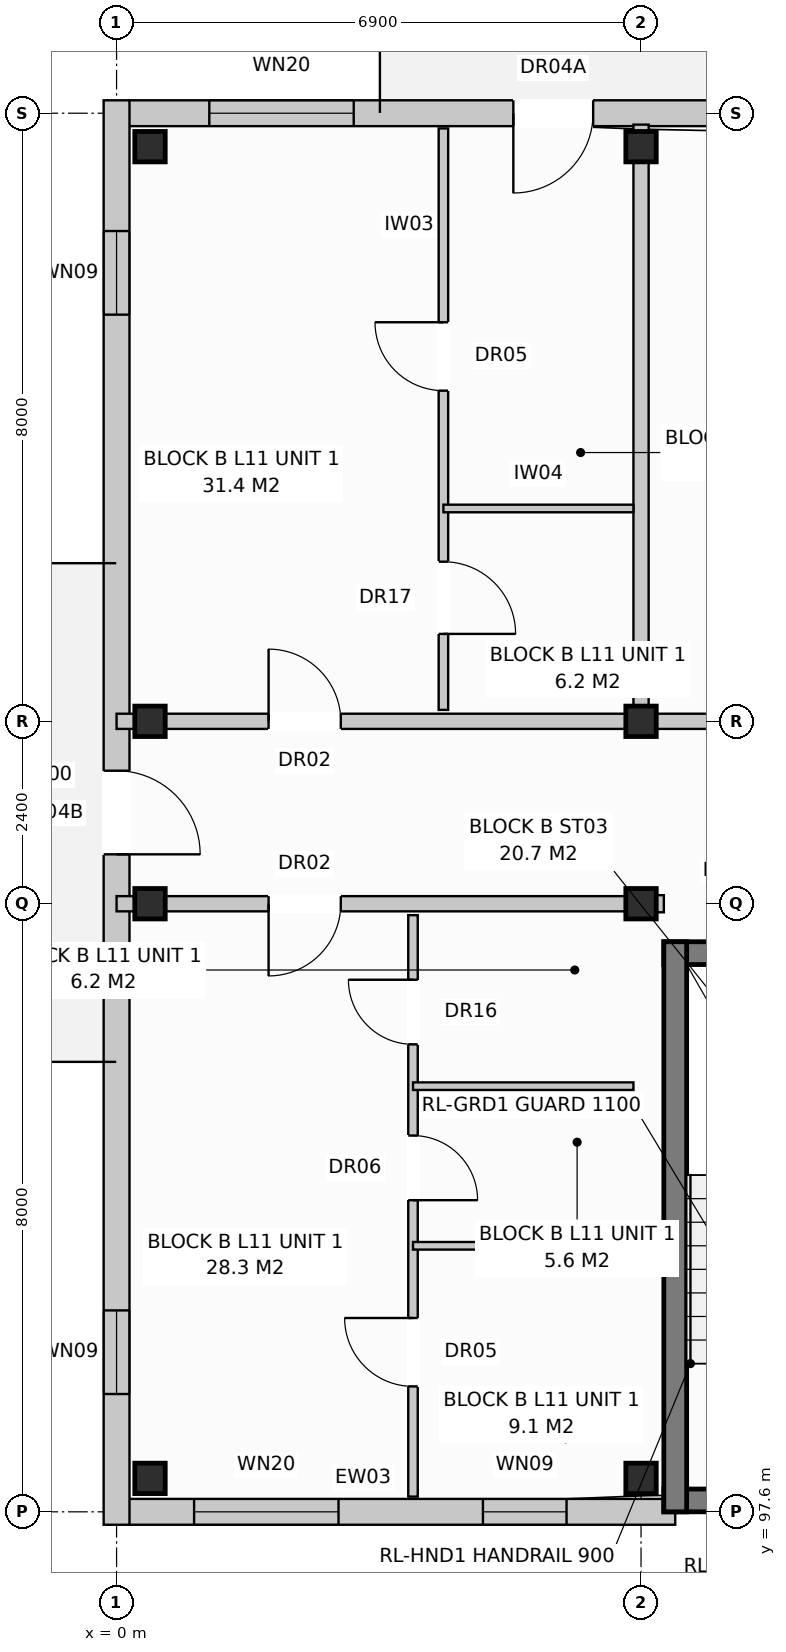
"""IFC4 building model, lengths in metres.
Left out: names, types, materials, properties, quantities, classifications, styles, units other than length and angle.
Written with IfcOpenShell. Run it as: python <this file> out.ifc"""

import sys

from ifc_helpers import new_model, si_unit, direction, frame, frame_2d, origin, origin_with_axes, origin_2d, place, context, subcontext, project, spatial, rectangle, extrude, element, fill, save


model = new_model("IFC4")
c1 = context("Model", 3, precision=1e-05, world=origin(), true_north=direction((0.0, 1.0)))
c2 = subcontext(c1, "Body", "Model", "MODEL_VIEW")
j1 = project(units=[si_unit("LENGTHUNIT", "METRE"), si_unit("PLANEANGLEUNIT", "RADIAN")], contexts=[c1])
p1 = place(None, origin())
s1 = spatial("IfcSite", under=j1, at=p1, CompositionType="ELEMENT")
p2 = place(p1, origin())
s2 = spatial("IfcBuilding", under=s1, at=p2, CompositionType="ELEMENT")
p3 = place(p2, frame((0.0, 0.0, 36.8)))
s3 = spatial("IfcBuildingStorey", under=s2, at=p3, CompositionType="ELEMENT", Elevation=36.8)
for number, where, z_axis, x_axis in (
    (1, (0.44, 98.04, 0.0), (0.0, 0.0, 1.0), (1.0, 0.0, 0.0)),
    (2, (0.44, 105.6, 0.0), (0.0, 0.0, 1.0), (1.0, 0.0, 0.0)),
    (3, (0.44, 108.0, 0.0), (0.0, 0.0, 1.0), (1.0, 0.0, 0.0)),
    (4, (0.44, 115.56, 0.0), (0.0, 0.0, 1.0), (1.0, 0.0, 0.0)),
    (5, (6.9, 98.04, 0.0), (0.0, 0.0, 1.0), (1.0, 0.0, 0.0)),
    (6, (6.9, 105.6, 0.0), (0.0, 0.0, 1.0), (1.0, 0.0, 0.0)),
    (7, (6.9, 108.0, 0.0), (0.0, 0.0, 1.0), (1.0, 0.0, 0.0)),
    (8, (6.9, 115.56, 0.0), (0.0, 0.0, 1.0), (1.0, 0.0, 0.0)),
):
    element("IfcColumn", number, at=place(p3, frame(where, z_axis=z_axis, x_axis=x_axis)), inside=s3, PredefinedType="COLUMN", context=c2, shape_type="SweptSolid", body=[
        extrude(rectangle(XDim=0.4, YDim=0.4, at=origin_2d()), origin(), (0.0, 0.0, 1.0), 3.2),
    ])
p4 = place(p3, frame((0.16, 97.6, 0.0), z_axis=(0.0, 0.0, 1.0), x_axis=(1.0, 0.0, 0.0)))
e9 = element("IfcWall", 9, at=p4, inside=s3, PredefinedType="STANDARD", context=c2, shape_type="SweptSolid", body=[
    extrude(rectangle(XDim=7.19, YDim=0.34, at=frame_2d((3.595, 0.0))), origin(), (0.0, 0.0, 1.0), 2.97),
])
p5 = place(p4, frame((0.86, 0.0, 0.8)))
e10 = element("IfcOpeningElement", 10, at=p5, cuts=e9, PredefinedType="OPENING", context=c2, shape_type="SweptSolid", body=[
    extrude(rectangle(XDim=1.9, YDim=1.85, at=frame_2d((0.95, 0.925))), frame((0.0, 0.182, 0.0), z_axis=(0.0, -1.0, 0.0), x_axis=(1.0, 0.0, 0.0)), (0.0, 0.0, 1.0), 0.364),
])
p6 = place(p4, frame((4.66, 0.0, 0.72)))
e11 = element("IfcOpeningElement", 11, at=p6, cuts=e9, PredefinedType="OPENING", context=c2, shape_type="SweptSolid", body=[
    extrude(rectangle(XDim=1.1, YDim=1.5, at=frame_2d((0.55, 0.75))), frame((0.0, 0.182, 0.0), z_axis=(0.0, -1.0, 0.0), x_axis=(1.0, 0.0, 0.0)), (0.0, 0.0, 1.0), 0.364),
])
p7 = place(p3, frame((0.16, 116.0, 0.0), z_axis=(0.0, 0.0, 1.0), x_axis=(1.0, 0.0, 0.0)))
e12 = element("IfcWall", 12, at=p7, inside=s3, PredefinedType="STANDARD", context=c2, shape_type="SweptSolid", body=[
    extrude(rectangle(XDim=41.08, YDim=0.34, at=frame_2d((20.54, 0.0))), origin(), (0.0, 0.0, 1.0), 2.97),
])
p8 = place(p7, frame((5.06, 0.0, 0.0)))
e13 = element("IfcOpeningElement", 13, at=p8, cuts=e12, PredefinedType="OPENING", context=c2, shape_type="SweptSolid", body=[
    extrude(rectangle(XDim=1.05, YDim=2.12, at=frame_2d((0.525, 1.06))), frame((0.0, 0.182, 0.0), z_axis=(0.0, -1.0, 0.0), x_axis=(1.0, 0.0, 0.0)), (0.0, 0.0, 1.0), 0.364),
])
p9 = place(p7, frame((18.86, 0.0, 0.0)))
e14 = element("IfcOpeningElement", 14, at=p9, cuts=e12, PredefinedType="OPENING", context=c2, shape_type="SweptSolid", body=[
    extrude(rectangle(XDim=1.05, YDim=2.12, at=frame_2d((0.525, 1.06))), frame((0.0, 0.182, 0.0), z_axis=(0.0, -1.0, 0.0), x_axis=(1.0, 0.0, 0.0)), (0.0, 0.0, 1.0), 0.364),
])
p10 = place(p7, frame((31.375, 0.0, 0.0)))
e15 = element("IfcOpeningElement", 15, at=p10, cuts=e12, PredefinedType="OPENING", context=c2, shape_type="SweptSolid", body=[
    extrude(rectangle(XDim=1.05, YDim=2.12, at=frame_2d((0.525, 1.06))), frame((0.0, 0.182, 0.0), z_axis=(0.0, -1.0, 0.0), x_axis=(1.0, 0.0, 0.0)), (0.0, 0.0, 1.0), 0.364),
])
p11 = place(p7, frame((1.06, 0.0, 0.8)))
e16 = element("IfcOpeningElement", 16, at=p11, cuts=e12, PredefinedType="OPENING", context=c2, shape_type="SweptSolid", body=[
    extrude(rectangle(XDim=1.9, YDim=1.85, at=frame_2d((0.95, 0.925))), frame((0.0, 0.182, 0.0), z_axis=(0.0, -1.0, 0.0), x_axis=(1.0, 0.0, 0.0)), (0.0, 0.0, 1.0), 0.364),
])
p12 = place(p7, frame((9.36, 0.0, 0.72)))
e17 = element("IfcOpeningElement", 17, at=p12, cuts=e12, PredefinedType="OPENING", context=c2, shape_type="SweptSolid", body=[
    extrude(rectangle(XDim=1.1, YDim=1.5, at=frame_2d((0.55, 0.75))), frame((0.0, 0.182, 0.0), z_axis=(0.0, -1.0, 0.0), x_axis=(1.0, 0.0, 0.0)), (0.0, 0.0, 1.0), 0.364),
])
p13 = place(p7, frame((14.71, 0.0, 0.8)))
e18 = element("IfcOpeningElement", 18, at=p13, cuts=e12, PredefinedType="OPENING", context=c2, shape_type="SweptSolid", body=[
    extrude(rectangle(XDim=1.8, YDim=1.7, at=frame_2d((0.9, 0.85))), frame((0.0, 0.182, 0.0), z_axis=(0.0, -1.0, 0.0), x_axis=(1.0, 0.0, 0.0)), (0.0, 0.0, 1.0), 0.364),
])
p14 = place(p7, frame((21.46, 0.0, 0.72)))
e19 = element("IfcOpeningElement", 19, at=p14, cuts=e12, PredefinedType="OPENING", context=c2, shape_type="SweptSolid", body=[
    extrude(rectangle(XDim=1.1, YDim=1.5, at=frame_2d((0.55, 0.75))), frame((0.0, 0.182, 0.0), z_axis=(0.0, -1.0, 0.0), x_axis=(1.0, 0.0, 0.0)), (0.0, 0.0, 1.0), 0.364),
])
p15 = place(p7, frame((24.435, 0.0, 0.8)))
e20 = element("IfcOpeningElement", 20, at=p15, cuts=e12, PredefinedType="OPENING", context=c2, shape_type="SweptSolid", body=[
    extrude(rectangle(XDim=1.95, YDim=1.65, at=frame_2d((0.975, 0.825))), frame((0.0, 0.182, 0.0), z_axis=(0.0, -1.0, 0.0), x_axis=(1.0, 0.0, 0.0)), (0.0, 0.0, 1.0), 0.364),
])
p16 = place(p7, frame((29.21, 0.0, 0.8)))
e21 = element("IfcOpeningElement", 21, at=p16, cuts=e12, PredefinedType="OPENING", context=c2, shape_type="SweptSolid", body=[
    extrude(rectangle(XDim=1.8, YDim=1.7, at=frame_2d((0.9, 0.85))), frame((0.0, 0.182, 0.0), z_axis=(0.0, -1.0, 0.0), x_axis=(1.0, 0.0, 0.0)), (0.0, 0.0, 1.0), 0.364),
])
p17 = place(p7, frame((35.26, 0.0, 0.72)))
e22 = element("IfcOpeningElement", 22, at=p17, cuts=e12, PredefinedType="OPENING", context=c2, shape_type="SweptSolid", body=[
    extrude(rectangle(XDim=1.1, YDim=1.5, at=frame_2d((0.55, 0.75))), frame((0.0, 0.182, 0.0), z_axis=(0.0, -1.0, 0.0), x_axis=(1.0, 0.0, 0.0)), (0.0, 0.0, 1.0), 0.364),
])
p18 = place(p7, frame((38.035, 0.0, 0.8)))
e23 = element("IfcOpeningElement", 23, at=p18, cuts=e12, PredefinedType="OPENING", context=c2, shape_type="SweptSolid", body=[
    extrude(rectangle(XDim=1.95, YDim=1.65, at=frame_2d((0.975, 0.825))), frame((0.0, 0.182, 0.0), z_axis=(0.0, -1.0, 0.0), x_axis=(1.0, 0.0, 0.0)), (0.0, 0.0, 1.0), 0.364),
])
p19 = place(p3, frame((0.0, 97.43, 0.0), z_axis=(0.0, 0.0, 1.0), x_axis=(0.0, 1.0, 0.0)))
e24 = element("IfcWall", 24, at=p19, inside=s3, PredefinedType="STANDARD", context=c2, shape_type="SweptSolid", body=[
    extrude(rectangle(XDim=18.74, YDim=0.34, at=frame_2d((9.37, 0.0))), origin(), (0.0, 0.0, 1.0), 2.97),
])
p20 = place(p19, frame((8.82, 0.0, 0.0)))
e25 = element("IfcOpeningElement", 25, at=p20, cuts=e24, PredefinedType="OPENING", context=c2, shape_type="SweptSolid", body=[
    extrude(rectangle(XDim=1.1, YDim=2.1, at=frame_2d((0.55, 1.05))), frame((0.0, 0.182, 0.0), z_axis=(0.0, -1.0, 0.0), x_axis=(1.0, 0.0, 0.0)), (0.0, 0.0, 1.0), 0.364),
])
p21 = place(p19, frame((1.72, 0.0, 0.72)))
e26 = element("IfcOpeningElement", 26, at=p21, cuts=e24, PredefinedType="OPENING", context=c2, shape_type="SweptSolid", body=[
    extrude(rectangle(XDim=1.1, YDim=1.5, at=frame_2d((0.55, 0.75))), frame((0.0, 0.182, 0.0), z_axis=(0.0, -1.0, 0.0), x_axis=(1.0, 0.0, 0.0)), (0.0, 0.0, 1.0), 0.364),
])
p22 = place(p19, frame((15.92, 0.0, 0.72)))
e27 = element("IfcOpeningElement", 27, at=p22, cuts=e24, PredefinedType="OPENING", context=c2, shape_type="SweptSolid", body=[
    extrude(rectangle(XDim=1.1, YDim=1.5, at=frame_2d((0.55, 0.75))), frame((0.0, 0.182, 0.0), z_axis=(0.0, -1.0, 0.0), x_axis=(1.0, 0.0, 0.0)), (0.0, 0.0, 1.0), 0.364),
])
for number, where, z_axis, x_axis in (
    (28, (7.2, 97.75, 0.0), (0.0, 0.0, 1.0), (1.0, 0.0, 0.0)),
    (29, (7.2, 104.95, 0.0), (0.0, 0.0, 1.0), (1.0, 0.0, 0.0)),
):
    element("IfcWall", number, at=place(p3, frame(where, z_axis=z_axis, x_axis=x_axis)), inside=s3, PredefinedType="SHEAR", context=c2, shape_type="SweptSolid", body=[
        extrude(rectangle(XDim=3.6, YDim=0.3, at=frame_2d((1.8, 0.0))), origin(), (0.0, 0.0, 1.0), 2.97),
    ])
p23 = place(p3, frame((7.35, 97.6, 0.0), z_axis=(0.0, 0.0, 1.0), x_axis=(0.0, 1.0, 0.0)))
e30 = element("IfcWall", 30, at=p23, inside=s3, PredefinedType="SHEAR", context=c2, shape_type="SweptSolid", body=[
    extrude(rectangle(XDim=7.5, YDim=0.3, at=frame_2d((3.75, 0.0))), origin(), (0.0, 0.0, 1.0), 2.97),
])
p24 = place(p3, frame((6.9, 105.6, 0.0), z_axis=(0.0, 0.0, 1.0), x_axis=(1.0, 0.0, 0.0)))
e31 = element("IfcWall", 31, at=p24, inside=s3, PredefinedType="PARTITIONING", context=c2, shape_type="SweptSolid", body=[
    extrude(rectangle(XDim=0.3, YDim=0.225, at=frame_2d((0.15, 0.0))), origin(), (0.0, 0.0, 1.0), 2.97),
])
p25 = place(p3, frame((6.9, 108.15, 0.0), z_axis=(0.0, 0.0, 1.0), x_axis=(0.0, 1.0, 0.0)))
e32 = element("IfcWall", 32, at=p25, inside=s3, PredefinedType="PARTITIONING", context=c2, shape_type="SweptSolid", body=[
    extrude(rectangle(XDim=7.7, YDim=0.2, at=frame_2d((3.85, 0.0))), origin(), (0.0, 0.0, 1.0), 2.41),
])
p26 = place(p3, frame((0.0, 108.0, 0.0), z_axis=(0.0, 0.0, 1.0), x_axis=(1.0, 0.0, 0.0)))
e33 = element("IfcWall", 33, at=p26, inside=s3, PredefinedType="PARTITIONING", context=c2, shape_type="SweptSolid", body=[
    extrude(rectangle(XDim=6.9, YDim=0.2, at=frame_2d((3.45, 0.0))), origin(), (0.0, 0.0, 1.0), 2.41),
])
p27 = place(p26, frame((2.0, 0.0, 0.0)))
e34 = element("IfcOpeningElement", 34, at=p27, cuts=e33, PredefinedType="OPENING", context=c2, shape_type="SweptSolid", body=[
    extrude(rectangle(XDim=0.95, YDim=2.15, at=frame_2d((0.475, 1.075))), frame((0.0, 0.112, 0.0), z_axis=(0.0, -1.0, 0.0), x_axis=(1.0, 0.0, 0.0)), (0.0, 0.0, 1.0), 0.224),
])
p28 = place(p3, frame((4.3, 108.15, 0.0), z_axis=(0.0, 0.0, 1.0), x_axis=(0.0, 1.0, 0.0)))
e35 = element("IfcWall", 35, at=p28, inside=s3, PredefinedType="PARTITIONING", context=c2, shape_type="SweptSolid", body=[
    extrude(rectangle(XDim=7.65, YDim=0.125, at=frame_2d((3.825, 0.0))), origin(), (0.0, 0.0, 1.0), 2.59),
])
p29 = place(p28, frame((1.0, 0.0, 0.0)))
e36 = element("IfcOpeningElement", 36, at=p29, cuts=e35, PredefinedType="OPENING", context=c2, shape_type="SweptSolid", body=[
    extrude(rectangle(XDim=0.95, YDim=2.1, at=frame_2d((0.475, 1.05))), frame((0.0, 0.074, 0.0), z_axis=(0.0, -1.0, 0.0), x_axis=(1.0, 0.0, 0.0)), (0.0, 0.0, 1.0), 0.149),
])
p30 = place(p28, frame((4.2, 0.0, 0.0)))
e37 = element("IfcOpeningElement", 37, at=p30, cuts=e35, PredefinedType="OPENING", context=c2, shape_type="SweptSolid", body=[
    extrude(rectangle(XDim=0.9, YDim=2.1, at=frame_2d((0.45, 1.05))), frame((0.0, 0.074, 0.0), z_axis=(0.0, -1.0, 0.0), x_axis=(1.0, 0.0, 0.0)), (0.0, 0.0, 1.0), 0.149),
])
p31 = place(p3, frame((4.3, 110.8, 0.0), z_axis=(0.0, 0.0, 1.0), x_axis=(1.0, 0.0, 0.0)))
e38 = element("IfcWall", 38, at=p31, inside=s3, PredefinedType="PARTITIONING", context=c2, shape_type="SweptSolid", body=[
    extrude(rectangle(XDim=2.5, YDim=0.1, at=frame_2d((1.25, 0.0))), origin(), (0.0, 0.0, 1.0), 2.97),
])
p32 = place(p3, frame((6.9, 108.0, 0.0), z_axis=(0.0, 0.0, 1.0), x_axis=(1.0, 0.0, 0.0)))
e39 = element("IfcWall", 39, at=p32, inside=s3, PredefinedType="PARTITIONING", context=c2, shape_type="SweptSolid", body=[
    extrude(rectangle(XDim=20.7, YDim=0.2, at=frame_2d((10.35, 0.0))), origin(), (0.0, 0.0, 1.0), 2.41),
])
p33 = place(p32, frame((2.4, 0.0, 0.0)))
e40 = element("IfcOpeningElement", 40, at=p33, cuts=e39, PredefinedType="OPENING", context=c2, shape_type="SweptSolid", body=[
    extrude(rectangle(XDim=0.95, YDim=2.15, at=frame_2d((0.475, 1.075))), frame((0.0, 0.112, 0.0), z_axis=(0.0, -1.0, 0.0), x_axis=(1.0, 0.0, 0.0)), (0.0, 0.0, 1.0), 0.224),
])
p34 = place(p3, frame((0.0, 105.6, 0.0), z_axis=(0.0, 0.0, 1.0), x_axis=(1.0, 0.0, 0.0)))
e41 = element("IfcWall", 41, at=p34, inside=s3, PredefinedType="PARTITIONING", context=c2, shape_type="SweptSolid", body=[
    extrude(rectangle(XDim=6.9, YDim=0.2, at=frame_2d((3.45, 0.0))), origin(), (0.0, 0.0, 1.0), 2.41),
])
p35 = place(p34, frame((2.0, 0.0, 0.0)))
e42 = element("IfcOpeningElement", 42, at=p35, cuts=e41, PredefinedType="OPENING", context=c2, shape_type="SweptSolid", body=[
    extrude(rectangle(XDim=0.95, YDim=2.15, at=frame_2d((0.475, 1.075))), frame((0.0, 0.112, 0.0), z_axis=(0.0, -1.0, 0.0), x_axis=(1.0, 0.0, 0.0)), (0.0, 0.0, 1.0), 0.224),
])
p36 = place(p3, frame((3.9, 105.45, 0.0), z_axis=(0.0, 0.0, 1.0), x_axis=(0.0, -1.0, 0.0)))
e43 = element("IfcWall", 43, at=p36, inside=s3, PredefinedType="PARTITIONING", context=c2, shape_type="SweptSolid", body=[
    extrude(rectangle(XDim=7.65, YDim=0.125, at=frame_2d((3.825, 0.0))), origin(), (0.0, 0.0, 1.0), 2.97),
])
p37 = place(p36, frame((0.85, 0.0, 0.0)))
e44 = element("IfcOpeningElement", 44, at=p37, cuts=e43, PredefinedType="OPENING", context=c2, shape_type="SweptSolid", body=[
    extrude(rectangle(XDim=0.85, YDim=2.1, at=frame_2d((0.425, 1.05))), frame((0.0, 0.074, 0.0), z_axis=(0.0, -1.0, 0.0), x_axis=(1.0, 0.0, 0.0)), (0.0, 0.0, 1.0), 0.149),
])
p38 = place(p36, frame((2.9, 0.0, 0.0)))
e45 = element("IfcOpeningElement", 45, at=p38, cuts=e43, PredefinedType="OPENING", context=c2, shape_type="SweptSolid", body=[
    extrude(rectangle(XDim=0.85, YDim=2.05, at=frame_2d((0.425, 1.025))), frame((0.0, 0.074, 0.0), z_axis=(0.0, -1.0, 0.0), x_axis=(1.0, 0.0, 0.0)), (0.0, 0.0, 1.0), 0.149),
])
p39 = place(p36, frame((5.3, 0.0, 0.0)))
e46 = element("IfcOpeningElement", 46, at=p39, cuts=e43, PredefinedType="OPENING", context=c2, shape_type="SweptSolid", body=[
    extrude(rectangle(XDim=0.9, YDim=2.1, at=frame_2d((0.45, 1.05))), frame((0.0, 0.074, 0.0), z_axis=(0.0, -1.0, 0.0), x_axis=(1.0, 0.0, 0.0)), (0.0, 0.0, 1.0), 0.149),
])
for number, where, z_axis, x_axis in (
    (47, (3.9, 103.2, 0.0), (0.0, 0.0, 1.0), (1.0, 0.0, 0.0)),
    (48, (3.9, 101.1, 0.0), (0.0, 0.0, 1.0), (1.0, 0.0, 0.0)),
):
    element("IfcWall", number, at=place(p3, frame(where, z_axis=z_axis, x_axis=x_axis)), inside=s3, PredefinedType="PARTITIONING", context=c2, shape_type="SweptSolid", body=[
        extrude(rectangle(XDim=2.9, YDim=0.1, at=frame_2d((1.45, 0.0))), origin(), (0.0, 0.0, 1.0), 2.97),
    ])
p40 = place(p5, origin_with_axes())
e49 = element("IfcWindow", 49, at=p40, inside=s3, PartitioningType="SINGLE_PANEL", PredefinedType="WINDOW", context=c2, shape_type="SweptSolid", body=[
    extrude(rectangle(XDim=1.9, YDim=1.85, at=frame_2d((0.95, 0.925))), frame((0.0, 0.03, 0.0), z_axis=(0.0, -1.0, 0.0), x_axis=(1.0, 0.0, 0.0)), (0.0, 0.0, 1.0), 0.06),
])
fill(e10, e49)
p41 = place(p6, origin_with_axes())
e50 = element("IfcWindow", 50, at=p41, inside=s3, PartitioningType="SINGLE_PANEL", PredefinedType="WINDOW", context=c2, shape_type="SweptSolid", body=[
    extrude(rectangle(XDim=1.1, YDim=1.5, at=frame_2d((0.55, 0.75))), frame((0.0, 0.03, 0.0), z_axis=(0.0, -1.0, 0.0), x_axis=(1.0, 0.0, 0.0)), (0.0, 0.0, 1.0), 0.06),
])
fill(e11, e50)
p42 = place(p8, frame((1.05, 0.0, 0.0), z_axis=(0.0, 0.0, 1.0), x_axis=(-1.0, 0.0, 0.0)))
e51 = element("IfcDoor", 51, at=p42, inside=s3, OperationType="SINGLE_SWING_LEFT", PredefinedType="DOOR", context=c2, shape_type="SweptSolid", body=[
    extrude(rectangle(XDim=1.05, YDim=2.12, at=frame_2d((0.525, 1.06))), frame((0.0, 0.025, 0.0), z_axis=(0.0, -1.0, 0.0), x_axis=(1.0, 0.0, 0.0)), (0.0, 0.0, 1.0), 0.05),
])
fill(e13, e51)
p43 = place(p11, origin_with_axes())
e52 = element("IfcWindow", 52, at=p43, inside=s3, PartitioningType="SINGLE_PANEL", PredefinedType="WINDOW", context=c2, shape_type="SweptSolid", body=[
    extrude(rectangle(XDim=1.9, YDim=1.85, at=frame_2d((0.95, 0.925))), frame((0.0, 0.03, 0.0), z_axis=(0.0, -1.0, 0.0), x_axis=(1.0, 0.0, 0.0)), (0.0, 0.0, 1.0), 0.06),
])
fill(e16, e52)
p44 = place(p20, frame((1.1, 0.0, 0.0), z_axis=(0.0, 0.0, 1.0), x_axis=(-1.0, 0.0, 0.0)))
e53 = element("IfcDoor", 53, at=p44, inside=s3, OperationType="SINGLE_SWING_LEFT", PredefinedType="DOOR", context=c2, shape_type="SweptSolid", body=[
    extrude(rectangle(XDim=1.1, YDim=2.1, at=frame_2d((0.55, 1.05))), frame((0.0, 0.025, 0.0), z_axis=(0.0, -1.0, 0.0), x_axis=(1.0, 0.0, 0.0)), (0.0, 0.0, 1.0), 0.05),
])
fill(e25, e53)
p45 = place(p21, origin_with_axes())
e54 = element("IfcWindow", 54, at=p45, inside=s3, PartitioningType="SINGLE_PANEL", PredefinedType="WINDOW", context=c2, shape_type="SweptSolid", body=[
    extrude(rectangle(XDim=1.1, YDim=1.5, at=frame_2d((0.55, 0.75))), frame((0.0, 0.03, 0.0), z_axis=(0.0, -1.0, 0.0), x_axis=(1.0, 0.0, 0.0)), (0.0, 0.0, 1.0), 0.06),
])
fill(e26, e54)
p46 = place(p22, origin_with_axes())
e55 = element("IfcWindow", 55, at=p46, inside=s3, PartitioningType="SINGLE_PANEL", PredefinedType="WINDOW", context=c2, shape_type="SweptSolid", body=[
    extrude(rectangle(XDim=1.1, YDim=1.5, at=frame_2d((0.55, 0.75))), frame((0.0, 0.03, 0.0), z_axis=(0.0, -1.0, 0.0), x_axis=(1.0, 0.0, 0.0)), (0.0, 0.0, 1.0), 0.06),
])
fill(e27, e55)
p47 = place(p27, origin_with_axes())
e56 = element("IfcDoor", 56, at=p47, inside=s3, OperationType="SINGLE_SWING_LEFT", PredefinedType="DOOR", context=c2, shape_type="SweptSolid", body=[
    extrude(rectangle(XDim=0.95, YDim=2.15, at=frame_2d((0.475, 1.075))), frame((0.0, 0.025, 0.0), z_axis=(0.0, -1.0, 0.0), x_axis=(1.0, 0.0, 0.0)), (0.0, 0.0, 1.0), 0.05),
])
fill(e34, e56)
p48 = place(p29, frame((0.95, 0.0, 0.0), z_axis=(0.0, 0.0, 1.0), x_axis=(-1.0, 0.0, 0.0)))
e57 = element("IfcDoor", 57, at=p48, inside=s3, OperationType="SINGLE_SWING_LEFT", PredefinedType="DOOR", context=c2, shape_type="SweptSolid", body=[
    extrude(rectangle(XDim=0.95, YDim=2.1, at=frame_2d((0.475, 1.05))), frame((0.0, 0.025, 0.0), z_axis=(0.0, -1.0, 0.0), x_axis=(1.0, 0.0, 0.0)), (0.0, 0.0, 1.0), 0.05),
])
fill(e36, e57)
p49 = place(p30, origin_with_axes())
e58 = element("IfcDoor", 58, at=p49, inside=s3, OperationType="SINGLE_SWING_RIGHT", PredefinedType="DOOR", context=c2, shape_type="SweptSolid", body=[
    extrude(rectangle(XDim=0.9, YDim=2.1, at=frame_2d((0.45, 1.05))), frame((0.0, 0.025, 0.0), z_axis=(0.0, -1.0, 0.0), x_axis=(1.0, 0.0, 0.0)), (0.0, 0.0, 1.0), 0.05),
])
fill(e37, e58)
p50 = place(p35, frame((0.95, 0.0, 0.0), z_axis=(0.0, 0.0, 1.0), x_axis=(-1.0, 0.0, 0.0)))
e59 = element("IfcDoor", 59, at=p50, inside=s3, OperationType="SINGLE_SWING_LEFT", PredefinedType="DOOR", context=c2, shape_type="SweptSolid", body=[
    extrude(rectangle(XDim=0.95, YDim=2.15, at=frame_2d((0.475, 1.075))), frame((0.0, 0.025, 0.0), z_axis=(0.0, -1.0, 0.0), x_axis=(1.0, 0.0, 0.0)), (0.0, 0.0, 1.0), 0.05),
])
fill(e42, e59)
p51 = place(p37, frame((0.85, 0.0, 0.0), z_axis=(0.0, 0.0, 1.0), x_axis=(-1.0, 0.0, 0.0)))
e60 = element("IfcDoor", 60, at=p51, inside=s3, OperationType="SINGLE_SWING_LEFT", PredefinedType="DOOR", context=c2, shape_type="SweptSolid", body=[
    extrude(rectangle(XDim=0.85, YDim=2.1, at=frame_2d((0.425, 1.05))), frame((0.0, 0.025, 0.0), z_axis=(0.0, -1.0, 0.0), x_axis=(1.0, 0.0, 0.0)), (0.0, 0.0, 1.0), 0.05),
])
fill(e44, e60)
p52 = place(p38, origin_with_axes())
e61 = element("IfcDoor", 61, at=p52, inside=s3, OperationType="SINGLE_SWING_RIGHT", PredefinedType="DOOR", context=c2, shape_type="SweptSolid", body=[
    extrude(rectangle(XDim=0.85, YDim=2.05, at=frame_2d((0.425, 1.025))), frame((0.0, 0.025, 0.0), z_axis=(0.0, -1.0, 0.0), x_axis=(1.0, 0.0, 0.0)), (0.0, 0.0, 1.0), 0.05),
])
fill(e45, e61)
p53 = place(p39, frame((0.9, 0.0, 0.0), z_axis=(0.0, 0.0, 1.0), x_axis=(-1.0, 0.0, 0.0)))
e62 = element("IfcDoor", 62, at=p53, inside=s3, OperationType="SINGLE_SWING_LEFT", PredefinedType="DOOR", context=c2, shape_type="SweptSolid", body=[
    extrude(rectangle(XDim=0.9, YDim=2.1, at=frame_2d((0.45, 1.05))), frame((0.0, 0.025, 0.0), z_axis=(0.0, -1.0, 0.0), x_axis=(1.0, 0.0, 0.0)), (0.0, 0.0, 1.0), 0.05),
])
fill(e46, e62)
save(model, sys.argv[1])
